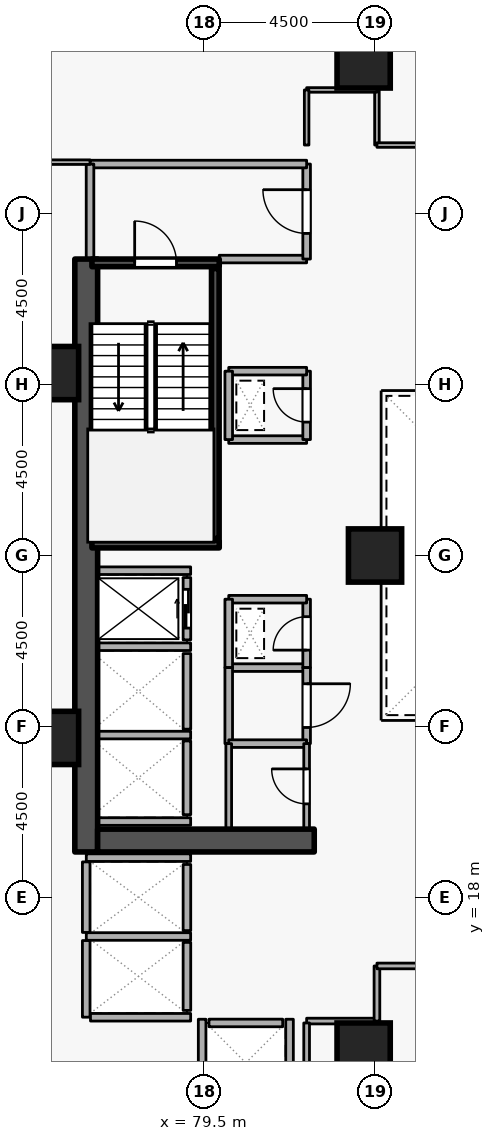
"""IFC4 building model, lengths in metres.
Left out: names, types, materials, properties, quantities, classifications, styles, units other than length and angle.
Written with IfcOpenShell. Run it as: python <this file> out.ifc"""

import sys

from ifc_helpers import new_model, si_unit, direction, frame, frame_2d, origin, origin_2d, place, context, subcontext, project, spatial, rectangle, extrude, element, fill, save


model = new_model("IFC4")
c1 = context("Model", 3, precision=1e-05, world=origin(), true_north=direction((0.0, 1.0)))
c2 = subcontext(c1, "Body", "Model", "MODEL_VIEW")
j1 = project(units=[si_unit("LENGTHUNIT", "METRE"), si_unit("PLANEANGLEUNIT", "RADIAN")], contexts=[c1])
p1 = place(None, origin())
s1 = spatial("IfcSite", under=j1, at=p1, CompositionType="ELEMENT")
p2 = place(p1, origin())
s2 = spatial("IfcBuilding", under=s1, at=p2, CompositionType="ELEMENT")
p3 = place(p2, frame((0.0, 0.0, 53.7)))
s3 = spatial("IfcBuildingStorey", under=s2, at=p3, CompositionType="ELEMENT", Elevation=53.7)
p4 = place(p3, frame((76.4, 19.2, 0.0), z_axis=(0.0, 0.0, 1.0), x_axis=(0.0, 1.0, 0.0)))
e1 = element("IfcWall", 1, at=p4, inside=s3, PredefinedType="SHEAR", context=c2, shape_type="SweptSolid", body=[
    extrude(rectangle(XDim=15.6, YDim=0.6, at=frame_2d((7.8, 0.0))), origin(), (0.0, 0.0, 1.0), 3.6),
])
p5 = place(p3, frame((76.7, 19.5, 0.0), z_axis=(0.0, 0.0, 1.0), x_axis=(1.0, 0.0, 0.0)))
e2 = element("IfcWall", 2, at=p5, inside=s3, PredefinedType="SHEAR", context=c2, shape_type="SweptSolid", body=[
    extrude(rectangle(XDim=5.7, YDim=0.6, at=frame_2d((2.85, 0.0))), origin(), (0.0, 0.0, 1.0), 3.6),
])
for number, where, z_axis, x_axis in (
    (3, (83.7, 14.0, 0.0), (0.0, 0.0, 1.0), (1.0, 0.0, 0.0)),
    (4, (83.7, 40.0, 0.0), (0.0, 0.0, 1.0), (1.0, 0.0, 0.0)),
    (5, (75.5, 22.2, 0.0), (0.0, 0.0, 1.0), (1.0, 0.0, 0.0)),
    (6, (75.5, 31.8, 0.0), (0.0, 0.0, 1.0), (1.0, 0.0, 0.0)),
    (7, (84.0, 27.0, 0.0), (0.0, 0.0, 1.0), (1.0, 0.0, 0.0)),
):
    element("IfcColumn", number, at=place(p3, frame(where, z_axis=z_axis, x_axis=x_axis)), inside=s3, PredefinedType="COLUMN", context=c2, shape_type="SweptSolid", body=[
        extrude(rectangle(XDim=1.4, YDim=1.4, at=origin_2d()), origin(), (0.0, 0.0, 1.0), 3.6),
    ])
p6 = place(p3, frame((79.05, 24.78, 0.0), z_axis=(0.0, 0.0, 1.0), x_axis=(0.0, 1.0, 0.0)))
e8 = element("IfcWall", 8, at=p6, inside=s3, PredefinedType="STANDARD", context=c2, shape_type="SweptSolid", body=[
    extrude(rectangle(XDim=1.64, YDim=0.2, at=frame_2d((0.82, 0.0))), origin(), (0.0, 0.0, 1.0), 3.34),
])
p7 = place(p6, frame((0.31, 0.0, 0.0)))
e9 = element("IfcOpeningElement", 9, at=p7, cuts=e8, PredefinedType="OPENING", context=c2, shape_type="SweptSolid", body=[
    extrude(rectangle(XDim=1.02, YDim=2.06, at=frame_2d((0.51, 1.03))), frame((0.0, 0.11, 0.0), z_axis=(0.0, -1.0, 0.0), x_axis=(1.0, 0.0, 0.0)), (0.0, 0.0, 1.0), 0.22),
])
p8 = place(p3, frame((79.05, 22.43, 0.0), z_axis=(0.0, 0.0, 1.0), x_axis=(0.0, 1.0, 0.0)))
e10 = element("IfcWall", 10, at=p8, inside=s3, PredefinedType="STANDARD", context=c2, shape_type="SweptSolid", body=[
    extrude(rectangle(XDim=1.99, YDim=0.2, at=frame_2d((0.995, 0.0))), origin(), (0.0, 0.0, 1.0), 3.34),
])
p9 = place(p3, frame((79.05, 20.18, 0.0), z_axis=(0.0, 0.0, 1.0), x_axis=(0.0, 1.0, 0.0)))
e11 = element("IfcWall", 11, at=p9, inside=s3, PredefinedType="STANDARD", context=c2, shape_type="SweptSolid", body=[
    extrude(rectangle(XDim=1.94, YDim=0.2, at=frame_2d((0.97, 0.0))), origin(), (0.0, 0.0, 1.0), 3.34),
])
p10 = place(p3, frame((79.05, 17.13, 0.0), z_axis=(0.0, 0.0, 1.0), x_axis=(0.0, 1.0, 0.0)))
e12 = element("IfcWall", 12, at=p10, inside=s3, PredefinedType="STANDARD", context=c2, shape_type="SweptSolid", body=[
    extrude(rectangle(XDim=1.74, YDim=0.2, at=frame_2d((0.87, 0.0))), origin(), (0.0, 0.0, 1.0), 3.34),
])
p11 = place(p3, frame((79.05, 15.03, 0.0), z_axis=(0.0, 0.0, 1.0), x_axis=(0.0, 1.0, 0.0)))
e13 = element("IfcWall", 13, at=p11, inside=s3, PredefinedType="STANDARD", context=c2, shape_type="SweptSolid", body=[
    extrude(rectangle(XDim=1.79, YDim=0.2, at=frame_2d((0.895, 0.0))), origin(), (0.0, 0.0, 1.0), 3.34),
])
p12 = place(p3, frame((79.63, 14.7, 0.0), z_axis=(0.0, 0.0, 1.0), x_axis=(1.0, 0.0, 0.0)))
e14 = element("IfcWall", 14, at=p12, inside=s3, PredefinedType="STANDARD", context=c2, shape_type="SweptSolid", body=[
    extrude(rectangle(XDim=1.94, YDim=0.2, at=frame_2d((0.97, 0.0))), origin(), (0.0, 0.0, 1.0), 3.34),
])
for number, where, z_axis, x_axis in (
    (15, (76.712, 26.6, 0.0), (0.0, 0.0, 1.0), (1.0, 0.0, 0.0)),
    (16, (76.712, 24.6, 0.0), (0.0, 0.0, 1.0), (1.0, 0.0, 0.0)),
    (17, (76.712, 22.275, 0.0), (0.0, 0.0, 1.0), (1.0, 0.0, 0.0)),
    (18, (76.712, 20.0, 0.0), (0.0, 0.0, 1.0), (1.0, 0.0, 0.0)),
):
    element("IfcWall", number, at=place(p3, frame(where, z_axis=z_axis, x_axis=x_axis)), inside=s3, PredefinedType="STANDARD", context=c2, shape_type="SweptSolid", body=[
        extrude(rectangle(XDim=2.436, YDim=0.2, at=frame_2d((1.218, 0.0))), origin(), (0.0, 0.0, 1.0), 3.34),
    ])
p13 = place(p3, frame((76.402, 19.05, 0.0), z_axis=(0.0, 0.0, 1.0), x_axis=(1.0, 0.0, 0.0)))
e19 = element("IfcWall", 19, at=p13, inside=s3, PredefinedType="STANDARD", context=c2, shape_type="SweptSolid", body=[
    extrude(rectangle(XDim=2.746, YDim=0.2, at=frame_2d((1.373, 0.0))), origin(), (0.0, 0.0, 1.0), 2.545),
])
p14 = place(p3, frame((76.402, 16.975, 0.0), z_axis=(0.0, 0.0, 1.0), x_axis=(1.0, 0.0, 0.0)))
e20 = element("IfcWall", 20, at=p14, inside=s3, PredefinedType="STANDARD", context=c2, shape_type="SweptSolid", body=[
    extrude(rectangle(XDim=2.746, YDim=0.2, at=frame_2d((1.373, 0.0))), origin(), (0.0, 0.0, 1.0), 3.34),
])
p15 = place(p3, frame((76.4, 14.852, 0.0), z_axis=(0.0, 0.0, 1.0), x_axis=(0.0, 1.0, 0.0)))
e21 = element("IfcWall", 21, at=p15, inside=s3, PredefinedType="STANDARD", context=c2, shape_type="SweptSolid", body=[
    extrude(rectangle(XDim=2.016, YDim=0.2, at=frame_2d((1.008, 0.0))), origin(), (0.0, 0.0, 1.0), 3.34),
])
p16 = place(p3, frame((76.4, 17.082, 0.0), z_axis=(0.0, 0.0, 1.0), x_axis=(0.0, 1.0, 0.0)))
e22 = element("IfcWall", 22, at=p16, inside=s3, PredefinedType="STANDARD", context=c2, shape_type="SweptSolid", body=[
    extrude(rectangle(XDim=1.856, YDim=0.2, at=frame_2d((0.928, 0.0))), origin(), (0.0, 0.0, 1.0), 3.34),
])
p17 = place(p3, frame((76.512, 14.85, 0.0), z_axis=(0.0, 0.0, 1.0), x_axis=(1.0, 0.0, 0.0)))
e23 = element("IfcWall", 23, at=p17, inside=s3, PredefinedType="STANDARD", context=c2, shape_type="SweptSolid", body=[
    extrude(rectangle(XDim=2.636, YDim=0.2, at=frame_2d((1.318, 0.0))), origin(), (0.0, 0.0, 1.0), 3.34),
])
for number, where, z_axis, x_axis in (
    (24, (81.75, 12.612, 0.0), (0.0, 0.0, 1.0), (0.0, 1.0, 0.0)),
    (25, (79.45, 12.612, 0.0), (0.0, 0.0, 1.0), (0.0, 1.0, 0.0)),
):
    element("IfcWall", number, at=place(p3, frame(where, z_axis=z_axis, x_axis=x_axis)), inside=s3, PredefinedType="STANDARD", context=c2, shape_type="SweptSolid", body=[
        extrude(rectangle(XDim=2.186, YDim=0.2, at=frame_2d((1.093, 0.0))), origin(), (0.0, 0.0, 1.0), 3.34),
    ])
p18 = place(p3, frame((76.55, 34.7, 0.0), z_axis=(0.0, 0.0, 1.0), x_axis=(1.0, 0.0, 0.0)))
e26 = element("IfcWall", 26, at=p18, inside=s3, PredefinedType="SHEAR", context=c2, shape_type="SweptSolid", body=[
    extrude(rectangle(XDim=3.35, YDim=0.2, at=frame_2d((1.675, 0.0))), origin(), (0.0, 0.0, 1.0), 3.6),
])
p19 = place(p18, frame((1.125, 0.0, 0.0)))
e27 = element("IfcOpeningElement", 27, at=p19, cuts=e26, PredefinedType="OPENING", context=c2, shape_type="SweptSolid", body=[
    extrude(rectangle(XDim=1.1, YDim=2.1, at=frame_2d((0.55, 1.05))), frame((0.0, 0.11, 0.0), z_axis=(0.0, -1.0, 0.0), x_axis=(1.0, 0.0, 0.0)), (0.0, 0.0, 1.0), 0.22),
])
p20 = place(p3, frame((79.9, 27.3, 0.0), z_axis=(0.0, 0.0, 1.0), x_axis=(-1.0, 0.0, 0.0)))
e28 = element("IfcWall", 28, at=p20, inside=s3, PredefinedType="SHEAR", context=c2, shape_type="SweptSolid", body=[
    extrude(rectangle(XDim=3.35, YDim=0.2, at=frame_2d((1.675, 0.0))), origin(), (0.0, 0.0, 1.0), 3.6),
])
p21 = place(p3, frame((79.797, 27.45, 0.0), z_axis=(0.0, 0.0, 1.0), x_axis=(0.0, 1.0, 0.0)))
e29 = element("IfcWall", 29, at=p21, inside=s3, PredefinedType="SHEAR", context=c2, shape_type="SweptSolid", body=[
    extrude(rectangle(XDim=7.1, YDim=0.2, at=frame_2d((3.55, 0.0))), origin(), (0.0, 0.0, 1.0), 3.6),
])
p22 = place(p3, frame((79.9, 34.8, 0.0), z_axis=(0.0, 0.0, 1.0), x_axis=(1.0, 0.0, 0.0)))
e30 = element("IfcWall", 30, at=p22, inside=s3, PredefinedType="STANDARD", context=c2, shape_type="SweptSolid", body=[
    extrude(rectangle(XDim=2.3, YDim=0.2, at=frame_2d((1.15, 0.0))), origin(), (0.0, 0.0, 1.0), 2.545),
])
p23 = place(p3, frame((82.2, 34.8, 0.0), z_axis=(0.0, 0.0, 1.0), x_axis=(0.0, 1.0, 0.0)))
e31 = element("IfcWall", 31, at=p23, inside=s3, PredefinedType="STANDARD", context=c2, shape_type="SweptSolid", body=[
    extrude(rectangle(XDim=2.5, YDim=0.2, at=frame_2d((1.25, 0.0))), origin(), (0.0, 0.0, 1.0), 3.34),
])
p24 = place(p23, frame((0.675, 0.0, 0.0)))
e32 = element("IfcOpeningElement", 32, at=p24, cuts=e31, PredefinedType="OPENING", context=c2, shape_type="SweptSolid", body=[
    extrude(rectangle(XDim=1.15, YDim=2.1, at=frame_2d((0.575, 1.05))), frame((0.0, 0.11, 0.0), z_axis=(0.0, -1.0, 0.0), x_axis=(1.0, 0.0, 0.0)), (0.0, 0.0, 1.0), 0.22),
])
p25 = place(p3, frame((82.2, 37.3, 0.0), z_axis=(0.0, 0.0, 1.0), x_axis=(-1.0, 0.0, 0.0)))
e33 = element("IfcWall", 33, at=p25, inside=s3, PredefinedType="STANDARD", context=c2, shape_type="SweptSolid", body=[
    extrude(rectangle(XDim=5.7, YDim=0.2, at=frame_2d((2.85, 0.0))), origin(), (0.0, 0.0, 1.0), 3.34),
])
p26 = place(p3, frame((76.5, 37.3, 0.0), z_axis=(0.0, 0.0, 1.0), x_axis=(0.0, -1.0, 0.0)))
e34 = element("IfcWall", 34, at=p26, inside=s3, PredefinedType="STANDARD", context=c2, shape_type="SweptSolid", body=[
    extrude(rectangle(XDim=2.5, YDim=0.2, at=frame_2d((1.25, 0.0))), origin(), (0.0, 0.0, 1.0), 3.34),
])
p27 = place(p3, frame((80.15, 24.05, 0.0), z_axis=(0.0, 0.0, 1.0), x_axis=(1.0, 0.0, 0.0)))
e35 = element("IfcWall", 35, at=p27, inside=s3, PredefinedType="STANDARD", context=c2, shape_type="SweptSolid", body=[
    extrude(rectangle(XDim=2.05, YDim=0.2, at=frame_2d((1.025, 0.0))), origin(), (0.0, 0.0, 1.0), 3.34),
])
p28 = place(p3, frame((82.2, 24.05, 0.0), z_axis=(0.0, 0.0, 1.0), x_axis=(0.0, 1.0, 0.0)))
e36 = element("IfcWall", 36, at=p28, inside=s3, PredefinedType="STANDARD", context=c2, shape_type="SweptSolid", body=[
    extrude(rectangle(XDim=1.8, YDim=0.2, at=frame_2d((0.9, 0.0))), origin(), (0.0, 0.0, 1.0), 3.34),
])
p29 = place(p28, frame((0.46, 0.0, 0.0)))
e37 = element("IfcOpeningElement", 37, at=p29, cuts=e36, PredefinedType="OPENING", context=c2, shape_type="SweptSolid", body=[
    extrude(rectangle(XDim=0.88, YDim=2.04, at=frame_2d((0.44, 1.02))), frame((0.0, 0.11, 0.0), z_axis=(0.0, -1.0, 0.0), x_axis=(1.0, 0.0, 0.0)), (0.0, 0.0, 1.0), 0.22),
])
p30 = place(p3, frame((82.2, 25.85, 0.0), z_axis=(0.0, 0.0, 1.0), x_axis=(-1.0, 0.0, 0.0)))
e38 = element("IfcWall", 38, at=p30, inside=s3, PredefinedType="STANDARD", context=c2, shape_type="SweptSolid", body=[
    extrude(rectangle(XDim=2.05, YDim=0.2, at=frame_2d((1.025, 0.0))), origin(), (0.0, 0.0, 1.0), 3.34),
])
p31 = place(p3, frame((80.15, 25.85, 0.0), z_axis=(0.0, 0.0, 1.0), x_axis=(0.0, -1.0, 0.0)))
e39 = element("IfcWall", 39, at=p31, inside=s3, PredefinedType="STANDARD", context=c2, shape_type="SweptSolid", body=[
    extrude(rectangle(XDim=1.8, YDim=0.2, at=frame_2d((0.9, 0.0))), origin(), (0.0, 0.0, 1.0), 3.34),
])
p32 = place(p3, frame((80.15, 30.05, 0.0), z_axis=(0.0, 0.0, 1.0), x_axis=(1.0, 0.0, 0.0)))
e40 = element("IfcWall", 40, at=p32, inside=s3, PredefinedType="STANDARD", context=c2, shape_type="SweptSolid", body=[
    extrude(rectangle(XDim=2.05, YDim=0.2, at=frame_2d((1.025, 0.0))), origin(), (0.0, 0.0, 1.0), 3.34),
])
p33 = place(p3, frame((82.2, 30.05, 0.0), z_axis=(0.0, 0.0, 1.0), x_axis=(0.0, 1.0, 0.0)))
e41 = element("IfcWall", 41, at=p33, inside=s3, PredefinedType="STANDARD", context=c2, shape_type="SweptSolid", body=[
    extrude(rectangle(XDim=1.8, YDim=0.2, at=frame_2d((0.9, 0.0))), origin(), (0.0, 0.0, 1.0), 3.34),
])
p34 = place(p33, frame((0.46, 0.0, 0.0)))
e42 = element("IfcOpeningElement", 42, at=p34, cuts=e41, PredefinedType="OPENING", context=c2, shape_type="SweptSolid", body=[
    extrude(rectangle(XDim=0.88, YDim=2.04, at=frame_2d((0.44, 1.02))), frame((0.0, 0.11, 0.0), z_axis=(0.0, -1.0, 0.0), x_axis=(1.0, 0.0, 0.0)), (0.0, 0.0, 1.0), 0.22),
])
p35 = place(p3, frame((82.2, 31.85, 0.0), z_axis=(0.0, 0.0, 1.0), x_axis=(-1.0, 0.0, 0.0)))
e43 = element("IfcWall", 43, at=p35, inside=s3, PredefinedType="STANDARD", context=c2, shape_type="SweptSolid", body=[
    extrude(rectangle(XDim=2.05, YDim=0.2, at=frame_2d((1.025, 0.0))), origin(), (0.0, 0.0, 1.0), 3.34),
])
p36 = place(p3, frame((80.15, 31.85, 0.0), z_axis=(0.0, 0.0, 1.0), x_axis=(0.0, -1.0, 0.0)))
e44 = element("IfcWall", 44, at=p36, inside=s3, PredefinedType="STANDARD", context=c2, shape_type="SweptSolid", body=[
    extrude(rectangle(XDim=1.8, YDim=0.2, at=frame_2d((0.9, 0.0))), origin(), (0.0, 0.0, 1.0), 3.34),
])
p37 = place(p3, frame((80.15, 22.05, 0.0), z_axis=(0.0, 0.0, 1.0), x_axis=(0.0, 1.0, 0.0)))
e45 = element("IfcWall", 45, at=p37, inside=s3, PredefinedType="STANDARD", context=c2, shape_type="SweptSolid", body=[
    extrude(rectangle(XDim=2.0, YDim=0.2, at=frame_2d((1.0, 0.0))), origin(), (0.0, 0.0, 1.0), 3.34),
])
p38 = place(p3, frame((82.2, 24.05, 0.0), z_axis=(0.0, 0.0, 1.0), x_axis=(0.0, -1.0, 0.0)))
e46 = element("IfcWall", 46, at=p38, inside=s3, PredefinedType="STANDARD", context=c2, shape_type="SweptSolid", body=[
    extrude(rectangle(XDim=2.0, YDim=0.2, at=frame_2d((1.0, 0.0))), origin(), (0.0, 0.0, 1.0), 3.34),
])
p39 = place(p38, frame((0.425, 0.0, 0.0)))
e47 = element("IfcOpeningElement", 47, at=p39, cuts=e46, PredefinedType="OPENING", context=c2, shape_type="SweptSolid", body=[
    extrude(rectangle(XDim=1.15, YDim=2.1, at=frame_2d((0.575, 1.05))), frame((0.0, 0.11, 0.0), z_axis=(0.0, -1.0, 0.0), x_axis=(1.0, 0.0, 0.0)), (0.0, 0.0, 1.0), 0.22),
])
p40 = place(p3, frame((82.2, 22.05, 0.0), z_axis=(0.0, 0.0, 1.0), x_axis=(-1.0, 0.0, 0.0)))
e48 = element("IfcWall", 48, at=p40, inside=s3, PredefinedType="STANDARD", context=c2, shape_type="SweptSolid", body=[
    extrude(rectangle(XDim=2.05, YDim=0.2, at=frame_2d((1.025, 0.0))), origin(), (0.0, 0.0, 1.0), 3.34),
])
p41 = place(p3, frame((82.2, 19.8, 0.0), z_axis=(0.0, 0.0, 1.0), x_axis=(0.0, 1.0, 0.0)))
e49 = element("IfcWall", 49, at=p41, inside=s3, PredefinedType="PARTITIONING", context=c2, shape_type="SweptSolid", body=[
    extrude(rectangle(XDim=2.25, YDim=0.15, at=frame_2d((1.125, 0.0))), origin(), (0.0, 0.0, 1.0), 3.34),
])
p42 = place(p41, frame((0.665, 0.0, 0.0)))
e50 = element("IfcOpeningElement", 50, at=p42, cuts=e49, PredefinedType="OPENING", context=c2, shape_type="SweptSolid", body=[
    extrude(rectangle(XDim=0.92, YDim=2.08, at=frame_2d((0.46, 1.04))), frame((0.0, 0.085, 0.0), z_axis=(0.0, -1.0, 0.0), x_axis=(1.0, 0.0, 0.0)), (0.0, 0.0, 1.0), 0.17),
])
p43 = place(p3, frame((80.15, 22.05, 0.0), z_axis=(0.0, 0.0, 1.0), x_axis=(0.0, -1.0, 0.0)))
e51 = element("IfcWall", 51, at=p43, inside=s3, PredefinedType="PARTITIONING", context=c2, shape_type="SweptSolid", body=[
    extrude(rectangle(XDim=2.25, YDim=0.15, at=frame_2d((1.125, 0.0))), origin(), (0.0, 0.0, 1.0), 3.34),
])
p44 = place(p3, frame((82.2, 14.75, 0.0), z_axis=(0.0, 0.0, 1.0), x_axis=(1.0, 0.0, 0.0)))
e52 = element("IfcWall", 52, at=p44, inside=s3, PredefinedType="PARTITIONING", context=c2, shape_type="SweptSolid", body=[
    extrude(rectangle(XDim=1.85, YDim=0.15, at=frame_2d((0.925, 0.0))), origin(), (0.0, 0.0, 1.0), 3.34),
])
p45 = place(p3, frame((84.05, 14.75, 0.0), z_axis=(0.0, 0.0, 1.0), x_axis=(0.0, 1.0, 0.0)))
e53 = element("IfcWall", 53, at=p45, inside=s3, PredefinedType="PARTITIONING", context=c2, shape_type="SweptSolid", body=[
    extrude(rectangle(XDim=1.45, YDim=0.15, at=frame_2d((0.725, 0.0))), origin(), (0.0, 0.0, 1.0), 3.34),
])
p46 = place(p3, frame((84.05, 16.2, 0.0), z_axis=(0.0, 0.0, 1.0), x_axis=(1.0, 0.0, 0.0)))
e54 = element("IfcWall", 54, at=p46, inside=s3, PredefinedType="PARTITIONING", context=c2, shape_type="SweptSolid", body=[
    extrude(rectangle(XDim=4.45, YDim=0.15, at=frame_2d((2.225, 0.0))), origin(), (0.0, 0.0, 1.0), 3.34),
])
p47 = place(p46, frame((1.575, 0.0, 0.0)))
e55 = element("IfcOpeningElement", 55, at=p47, cuts=e54, PredefinedType="OPENING", context=c2, shape_type="SweptSolid", body=[
    extrude(rectangle(XDim=1.3, YDim=2.12, at=frame_2d((0.65, 1.06))), frame((0.0, 0.085, 0.0), z_axis=(0.0, -1.0, 0.0), x_axis=(1.0, 0.0, 0.0)), (0.0, 0.0, 1.0), 0.17),
])
p48 = place(p3, frame((82.2, 12.4, 0.0), z_axis=(0.0, 0.0, 1.0), x_axis=(0.0, 1.0, 0.0)))
e56 = element("IfcWall", 56, at=p48, inside=s3, PredefinedType="PARTITIONING", context=c2, shape_type="SweptSolid", body=[
    extrude(rectangle(XDim=2.3, YDim=0.15, at=frame_2d((1.15, 0.0))), origin(), (0.0, 0.0, 1.0), 3.34),
])
p49 = place(p3, frame((84.05, 37.8, 0.0), z_axis=(0.0, 0.0, 1.0), x_axis=(0.0, 1.0, 0.0)))
e57 = element("IfcWall", 57, at=p49, inside=s3, PredefinedType="PARTITIONING", context=c2, shape_type="SweptSolid", body=[
    extrude(rectangle(XDim=1.45, YDim=0.12, at=frame_2d((0.725, 0.0))), origin(), (0.0, 0.0, 1.0), 3.34),
])
p50 = place(p3, frame((84.05, 39.25, 0.0), z_axis=(0.0, 0.0, 1.0), x_axis=(-1.0, 0.0, 0.0)))
e58 = element("IfcWall", 58, at=p50, inside=s3, PredefinedType="PARTITIONING", context=c2, shape_type="SweptSolid", body=[
    extrude(rectangle(XDim=1.85, YDim=0.12, at=frame_2d((0.925, 0.0))), origin(), (0.0, 0.0, 1.0), 3.34),
])
p51 = place(p3, frame((82.2, 39.25, 0.0), z_axis=(0.0, 0.0, 1.0), x_axis=(0.0, -1.0, 0.0)))
e59 = element("IfcWall", 59, at=p51, inside=s3, PredefinedType="PARTITIONING", context=c2, shape_type="SweptSolid", body=[
    extrude(rectangle(XDim=1.45, YDim=0.12, at=frame_2d((0.725, 0.0))), origin(), (0.0, 0.0, 1.0), 3.34),
])
p52 = place(p3, frame((76.5, 37.35, 0.0), z_axis=(0.0, 0.0, 1.0), x_axis=(-1.0, 0.0, 0.0)))
e60 = element("IfcWall", 60, at=p52, inside=s3, PredefinedType="PARTITIONING", context=c2, shape_type="SweptSolid", body=[
    extrude(rectangle(XDim=6.22, YDim=0.12, at=frame_2d((3.11, 0.0))), origin(), (0.0, 0.0, 1.0), 3.34),
])
p53 = place(p3, frame((88.5, 37.8, 0.0), z_axis=(0.0, 0.0, 1.0), x_axis=(-1.0, 0.0, 0.0)))
e61 = element("IfcWall", 61, at=p53, inside=s3, PredefinedType="PARTITIONING", context=c2, shape_type="SweptSolid", body=[
    extrude(rectangle(XDim=4.45, YDim=0.12, at=frame_2d((2.225, 0.0))), origin(), (0.0, 0.0, 1.0), 3.34),
])
p54 = place(p53, frame((1.7, 0.0, 0.0)))
e62 = element("IfcOpeningElement", 62, at=p54, cuts=e61, PredefinedType="OPENING", context=c2, shape_type="SweptSolid", body=[
    extrude(rectangle(XDim=1.05, YDim=2.1, at=frame_2d((0.525, 1.05))), frame((0.0, 0.07, 0.0), z_axis=(0.0, -1.0, 0.0), x_axis=(1.0, 0.0, 0.0)), (0.0, 0.0, 1.0), 0.14),
])
p55 = place(p7, origin())
e63 = element("IfcDoor", 63, at=p55, inside=s3, OperationType="SLIDING_TO_LEFT", PredefinedType="DOOR", context=c2, shape_type="SweptSolid", body=[
    extrude(rectangle(XDim=1.02, YDim=2.06, at=frame_2d((0.51, 1.03))), frame((0.0, 0.025, 0.0), z_axis=(0.0, -1.0, 0.0), x_axis=(1.0, 0.0, 0.0)), (0.0, 0.0, 1.0), 0.05),
])
fill(e9, e63)
p56 = place(p19, origin())
e64 = element("IfcDoor", 64, at=p56, inside=s3, OperationType="SINGLE_SWING_LEFT", PredefinedType="DOOR", context=c2, shape_type="SweptSolid", body=[
    extrude(rectangle(XDim=1.1, YDim=2.1, at=frame_2d((0.55, 1.05))), frame((0.0, 0.025, 0.0), z_axis=(0.0, -1.0, 0.0), x_axis=(1.0, 0.0, 0.0)), (0.0, 0.0, 1.0), 0.05),
])
fill(e27, e64)
p57 = place(p24, origin())
e65 = element("IfcDoor", 65, at=p57, inside=s3, OperationType="SINGLE_SWING_RIGHT", PredefinedType="DOOR", context=c2, shape_type="SweptSolid", body=[
    extrude(rectangle(XDim=1.15, YDim=2.1, at=frame_2d((0.575, 1.05))), frame((0.0, 0.025, 0.0), z_axis=(0.0, -1.0, 0.0), x_axis=(1.0, 0.0, 0.0)), (0.0, 0.0, 1.0), 0.05),
])
fill(e32, e65)
p58 = place(p29, origin())
e66 = element("IfcDoor", 66, at=p58, inside=s3, OperationType="SINGLE_SWING_LEFT", PredefinedType="DOOR", context=c2, shape_type="SweptSolid", body=[
    extrude(rectangle(XDim=0.88, YDim=2.04, at=frame_2d((0.44, 1.02))), frame((0.0, 0.025, 0.0), z_axis=(0.0, -1.0, 0.0), x_axis=(1.0, 0.0, 0.0)), (0.0, 0.0, 1.0), 0.05),
])
fill(e37, e66)
p59 = place(p34, origin())
e67 = element("IfcDoor", 67, at=p59, inside=s3, OperationType="SINGLE_SWING_RIGHT", PredefinedType="DOOR", context=c2, shape_type="SweptSolid", body=[
    extrude(rectangle(XDim=0.88, YDim=2.04, at=frame_2d((0.44, 1.02))), frame((0.0, 0.025, 0.0), z_axis=(0.0, -1.0, 0.0), x_axis=(1.0, 0.0, 0.0)), (0.0, 0.0, 1.0), 0.05),
])
fill(e42, e67)
p60 = place(p42, origin())
e68 = element("IfcDoor", 68, at=p60, inside=s3, OperationType="SINGLE_SWING_RIGHT", PredefinedType="DOOR", context=c2, shape_type="SweptSolid", body=[
    extrude(rectangle(XDim=0.92, YDim=2.08, at=frame_2d((0.46, 1.04))), frame((0.0, 0.025, 0.0), z_axis=(0.0, -1.0, 0.0), x_axis=(1.0, 0.0, 0.0)), (0.0, 0.0, 1.0), 0.05),
])
fill(e50, e68)
p61 = place(p39, origin())
e69 = element("IfcDoor", 69, at=p61, inside=s3, OperationType="SINGLE_SWING_LEFT", PredefinedType="DOOR", context=c2, shape_type="SweptSolid", body=[
    extrude(rectangle(XDim=1.15, YDim=2.1, at=frame_2d((0.575, 1.05))), frame((0.0, 0.025, 0.0), z_axis=(0.0, -1.0, 0.0), x_axis=(1.0, 0.0, 0.0)), (0.0, 0.0, 1.0), 0.05),
])
fill(e47, e69)
save(model, sys.argv[1])
